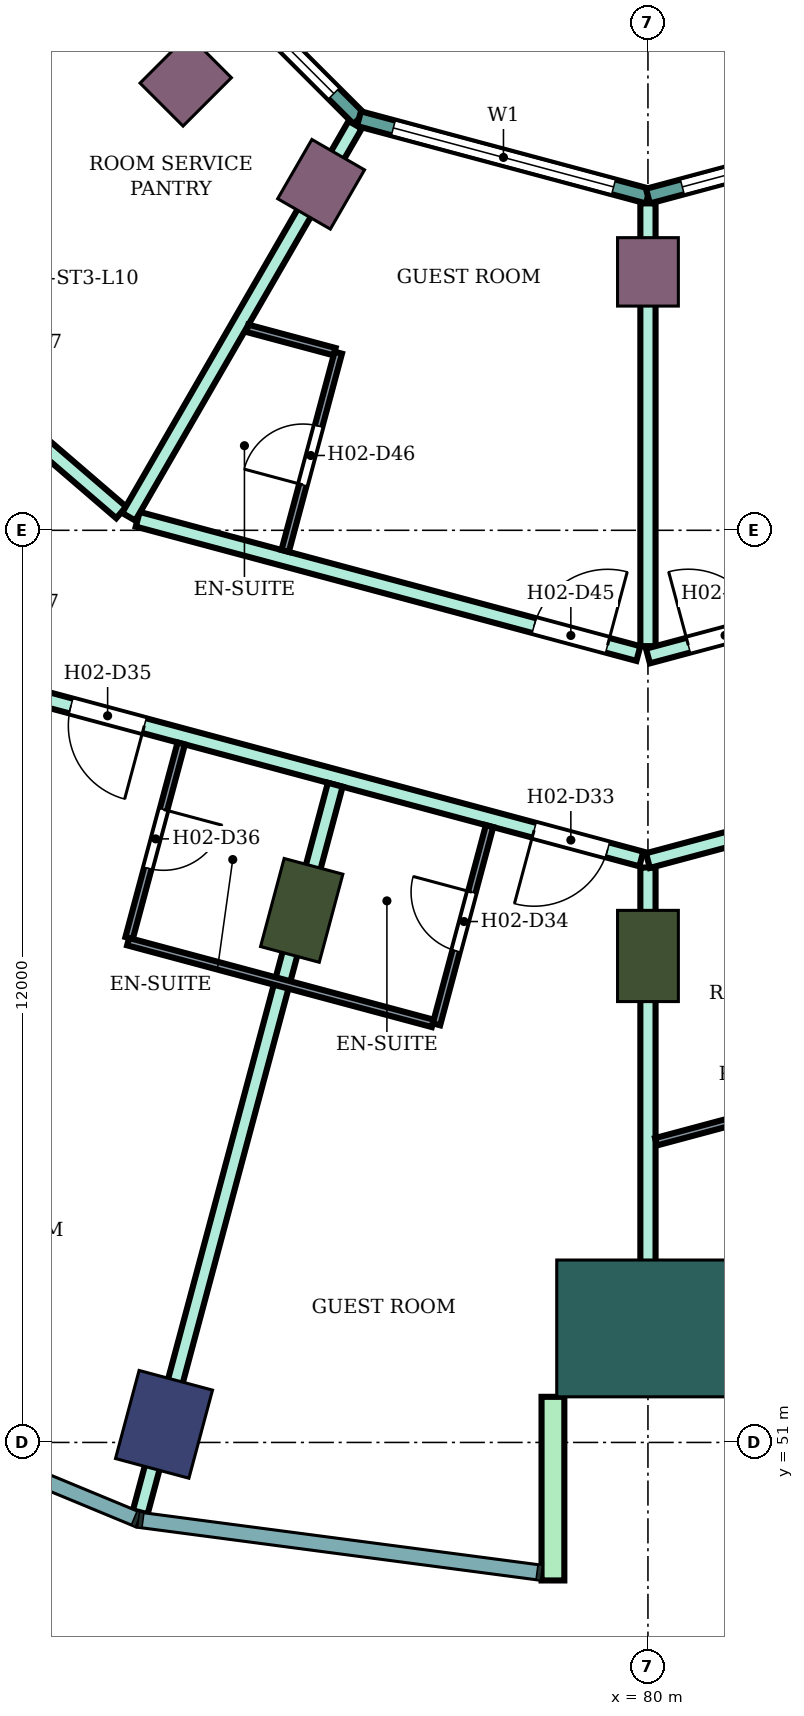
"""IFC4 building model, lengths in metres.
Left out: names, types, materials, properties, quantities, classifications, styles, units other than length and angle.
Written with IfcOpenShell. Run it as: python <this file> out.ifc"""

import sys

from ifc_helpers import new_model, si_unit, direction, frame, frame_2d, origin, origin_2d, place, context, subcontext, project, spatial, rectangle, extrude, element, fill, save


model = new_model("IFC4")
c1 = context("Model", 3, precision=1e-05, world=origin(), true_north=direction((0.0, 1.0)))
c2 = subcontext(c1, "Body", "Model", "MODEL_VIEW")
j1 = project(units=[si_unit("LENGTHUNIT", "METRE"), si_unit("PLANEANGLEUNIT", "RADIAN")], contexts=[c1])
p1 = place(None, origin())
s1 = spatial("IfcSite", under=j1, at=p1, CompositionType="ELEMENT")
p2 = place(p1, origin())
s2 = spatial("IfcBuilding", under=s1, at=p2, CompositionType="ELEMENT")
p3 = place(p2, frame((0.0, 0.0, 47.8)))
s3 = spatial("IfcBuildingStorey", under=s2, at=p3, CompositionType="ELEMENT", Elevation=47.8)
p4 = place(p3, frame((73.633, 51.238, 0.0), z_axis=(0.0, 0.0, 1.0), x_axis=(-0.258819045103, -0.965925826289, 0.0)))
e1 = element("IfcColumn", 1, at=p4, inside=s3, PredefinedType="COLUMN", context=c2, shape_type="SweptSolid", body=[
    extrude(rectangle(XDim=1.2, YDim=1.0, at=origin_2d()), origin(), (0.0, 0.0, 1.0), 3.8),
])
for number, where, z_axis, x_axis in (
    (2, (75.445, 58.0, 0.0), (0.0, 0.0, 1.0), (-0.259, -0.966, 0.0)),
    (3, (80.0, 57.4, 0.0), (0.0, 0.0, 1.0), (0.0, -1.0, 0.0)),
):
    element("IfcColumn", number, at=place(p3, frame(where, z_axis=z_axis, x_axis=x_axis)), inside=s3, PredefinedType="COLUMN", context=c2, shape_type="SweptSolid", body=[
        extrude(rectangle(XDim=1.2, YDim=0.8, at=origin_2d()), origin(), (0.0, 0.0, 1.0), 3.8),
    ])
for number, where, z_axis, x_axis in (
    (4, (73.919, 68.919, 0.0), (0.0, 0.0, 1.0), (-0.707, -0.707, 0.0)),
    (5, (75.7, 67.552, 0.0), (0.0, 0.0, 1.0), (-0.5, -0.866, 0.0)),
    (6, (80.0, 66.4, 0.0), (0.0, 0.0, 1.0), (0.0, -1.0, 0.0)),
):
    element("IfcColumn", number, at=place(p3, frame(where, z_axis=z_axis, x_axis=x_axis)), inside=s3, PredefinedType="COLUMN", context=c2, shape_type="SweptSolid", body=[
        extrude(rectangle(XDim=0.9, YDim=0.8, at=origin_2d()), origin(), (0.0, 0.0, 1.0), 3.8),
    ])
p5 = place(p3, frame((80.0, 52.5, 0.0), z_axis=(0.0, 0.0, 1.0), x_axis=(0.0, -1.0, 0.0)))
e7 = element("IfcColumn", 7, at=p5, inside=s3, PredefinedType="COLUMN", context=c2, shape_type="SweptSolid", body=[
    extrude(rectangle(XDim=1.8, YDim=2.4, at=origin_2d()), origin(), (0.0, 0.0, 1.0), 3.8),
])
p6 = place(p3, frame((78.75, 51.6, 0.0), z_axis=(0.0, 0.0, 1.0), x_axis=(0.0, -1.0, 0.0)))
e8 = element("IfcWall", 8, at=p6, inside=s3, PredefinedType="NOTDEFINED", context=c2, shape_type="SweptSolid", body=[
    extrude(rectangle(XDim=2.416, YDim=0.3, at=frame_2d((1.208, 0.0))), origin(), (0.0, 0.0, 1.0), 3.8),
])
p7 = place(p3, frame((73.415, 71.198, 0.0), z_axis=(0.0, 0.0, 1.0), x_axis=(0.707106781187, -0.707106781187, 0.0)))
e9 = element("IfcWall", 9, at=p7, inside=s3, PredefinedType="NOTDEFINED", context=c2, shape_type="SweptSolid", body=[
    extrude(rectangle(XDim=3.936, YDim=0.2, at=frame_2d((1.968, 0.0))), origin(), (0.0, 0.0, 1.0), 3.8),
])
p8 = place(p7, frame((0.468, 0.0, 0.9)))
e10 = element("IfcOpeningElement", 10, at=p8, cuts=e9, PredefinedType="OPENING", context=c2, shape_type="SweptSolid", body=[
    extrude(rectangle(XDim=3.0, YDim=2.3, at=frame_2d((1.5, 1.15))), frame((0.0, 0.11, 0.0), z_axis=(0.0, -1.0, 0.0), x_axis=(1.0, 0.0, 0.0)), (0.0, 0.0, 1.0), 0.22),
])
p9 = place(p3, frame((76.198, 68.415, 0.0), z_axis=(0.0, 0.0, 1.0), x_axis=(0.965933654434, -0.258789828301, 0.0)))
e11 = element("IfcWall", 11, at=p9, inside=s3, PredefinedType="NOTDEFINED", context=c2, shape_type="SweptSolid", body=[
    extrude(rectangle(XDim=3.936, YDim=0.2, at=frame_2d((1.968, 0.0))), origin(), (0.0, 0.0, 1.0), 3.8),
])
p10 = place(p9, frame((0.468, 0.0, 0.9)))
e12 = element("IfcOpeningElement", 12, at=p10, cuts=e11, PredefinedType="OPENING", context=c2, shape_type="SweptSolid", body=[
    extrude(rectangle(XDim=3.0, YDim=2.3, at=frame_2d((1.5, 1.15))), frame((0.0, 0.11, 0.0), z_axis=(0.0, -1.0, 0.0), x_axis=(1.0, 0.0, 0.0)), (0.0, 0.0, 1.0), 0.22),
])
p11 = place(p3, frame((80.0, 67.396, 0.0), z_axis=(0.0, 0.0, 1.0), x_axis=(0.965933654434, 0.258789828301, 0.0)))
e13 = element("IfcWall", 13, at=p11, inside=s3, PredefinedType="NOTDEFINED", context=c2, shape_type="SweptSolid", body=[
    extrude(rectangle(XDim=3.936, YDim=0.2, at=frame_2d((1.968, 0.0))), origin(), (0.0, 0.0, 1.0), 3.8),
])
p12 = place(p11, frame((0.468, 0.0, 0.9)))
e14 = element("IfcOpeningElement", 14, at=p12, cuts=e13, PredefinedType="OPENING", context=c2, shape_type="SweptSolid", body=[
    extrude(rectangle(XDim=3.0, YDim=2.3, at=frame_2d((1.5, 1.15))), frame((0.0, 0.11, 0.0), z_axis=(0.0, -1.0, 0.0), x_axis=(1.0, 0.0, 0.0)), (0.0, 0.0, 1.0), 0.22),
])
p13 = place(p3, frame((69.158, 66.6, 0.0), z_axis=(0.0, 0.0, 1.0), x_axis=(0.758063092745, -0.652181222835, 0.0)))
e15 = element("IfcWall", 15, at=p13, inside=s3, PredefinedType="PARTITIONING", context=c2, shape_type="SweptSolid", body=[
    extrude(rectangle(XDim=5.16, YDim=0.2, at=frame_2d((2.58, 0.0))), origin(), (0.0, 0.0, 1.0), 3.35),
])
p14 = place(p13, frame((2.165, 0.0, 0.0)))
e16 = element("IfcOpeningElement", 16, at=p14, cuts=e15, PredefinedType="OPENING", context=c2, shape_type="SweptSolid", body=[
    extrude(rectangle(XDim=0.9, YDim=2.1, at=frame_2d((0.45, 1.05))), frame((0.0, 0.11, 0.0), z_axis=(0.0, -1.0, 0.0), x_axis=(1.0, 0.0, 0.0)), (0.0, 0.0, 1.0), 0.22),
])
p15 = place(p3, frame((71.877, 60.832, 0.0), z_axis=(0.0, 0.0, 1.0), x_axis=(0.965852509869, -0.259092510851, 0.0)))
e17 = element("IfcWall", 17, at=p15, inside=s3, PredefinedType="PARTITIONING", context=c2, shape_type="SweptSolid", body=[
    extrude(rectangle(XDim=8.32, YDim=0.2, at=frame_2d((4.16, 0.0))), origin(), (0.0, 0.0, 1.0), 3.35),
])
p16 = place(p15, frame((6.86, 0.0, 0.0)))
e18 = element("IfcOpeningElement", 18, at=p16, cuts=e17, PredefinedType="OPENING", context=c2, shape_type="SweptSolid", body=[
    extrude(rectangle(XDim=1.0, YDim=2.1, at=frame_2d((0.5, 1.05))), frame((0.0, 0.11, 0.0), z_axis=(0.0, -1.0, 0.0), x_axis=(1.0, 0.0, 0.0)), (0.0, 0.0, 1.0), 0.22),
])
p17 = place(p15, frame((0.55, 0.0, 0.0)))
e19 = element("IfcOpeningElement", 19, at=p17, cuts=e17, PredefinedType="OPENING", context=c2, shape_type="SweptSolid", body=[
    extrude(rectangle(XDim=1.0, YDim=2.1, at=frame_2d((0.5, 1.05))), frame((0.0, 0.11, 0.0), z_axis=(0.0, -1.0, 0.0), x_axis=(1.0, 0.0, 0.0)), (0.0, 0.0, 1.0), 0.22),
])
p18 = place(p3, frame((73.287, 63.145, 0.0), z_axis=(0.0, 0.0, 1.0), x_axis=(0.965854200194, -0.259086209526, 0.0)))
e20 = element("IfcWall", 20, at=p18, inside=s3, PredefinedType="PARTITIONING", context=c2, shape_type="SweptSolid", body=[
    extrude(rectangle(XDim=6.82, YDim=0.2, at=frame_2d((3.41, 0.0))), origin(), (0.0, 0.0, 1.0), 3.35),
])
p19 = place(p18, frame((5.4, 0.0, 0.0)))
e21 = element("IfcOpeningElement", 21, at=p19, cuts=e20, PredefinedType="OPENING", context=c2, shape_type="SweptSolid", body=[
    extrude(rectangle(XDim=1.0, YDim=2.1, at=frame_2d((0.5, 1.05))), frame((0.0, 0.11, 0.0), z_axis=(0.0, -1.0, 0.0), x_axis=(1.0, 0.0, 0.0)), (0.0, 0.0, 1.0), 0.22),
])
p20 = place(p3, frame((73.169, 63.178, 0.0), z_axis=(0.0, 0.0, 1.0), x_axis=(0.50020860964, 0.865904929448, 0.0)))
e22 = element("IfcWall", 22, at=p20, inside=s3, PredefinedType="PARTITIONING", context=c2, shape_type="SweptSolid", body=[
    extrude(rectangle(XDim=5.955, YDim=0.2, at=frame_2d((2.978, 0.0))), origin(), (0.0, 0.0, 1.0), 3.35),
])
p21 = place(p3, frame((73.321, 50.081, 0.0), z_axis=(0.0, 0.0, 1.0), x_axis=(0.25891218439, 0.965900864879, 0.0)))
e23 = element("IfcWall", 23, at=p21, inside=s3, PredefinedType="PARTITIONING", context=c2, shape_type="SweptSolid", body=[
    extrude(rectangle(XDim=9.909, YDim=0.2, at=frame_2d((4.955, 0.0))), origin(), (0.0, 0.0, 1.0), 3.35),
])
p22 = place(p3, frame((80.0, 51.8, 0.0), z_axis=(0.0, 0.0, 1.0), x_axis=(0.0, 1.0, 0.0)))
e24 = element("IfcWall", 24, at=p22, inside=s3, PredefinedType="PARTITIONING", context=c2, shape_type="SweptSolid", body=[
    extrude(rectangle(XDim=6.764, YDim=0.2, at=frame_2d((3.382, 0.0))), origin(), (0.0, 0.0, 1.0), 3.35),
])
p23 = place(p3, frame((80.0, 58.655, 0.0), z_axis=(0.0, 0.0, 1.0), x_axis=(0.965967338894, 0.258664068224, 0.0)))
e25 = element("IfcWall", 25, at=p23, inside=s3, PredefinedType="PARTITIONING", context=c2, shape_type="SweptSolid", body=[
    extrude(rectangle(XDim=8.36, YDim=0.2, at=frame_2d((4.18, 0.0))), origin(), (0.0, 0.0, 1.0), 3.35),
])
p24 = place(p23, frame((6.86, 0.0, 0.0)))
e26 = element("IfcOpeningElement", 26, at=p24, cuts=e25, PredefinedType="OPENING", context=c2, shape_type="SweptSolid", body=[
    extrude(rectangle(XDim=1.0, YDim=2.1, at=frame_2d((0.5, 1.05))), frame((0.0, 0.11, 0.0), z_axis=(0.0, -1.0, 0.0), x_axis=(1.0, 0.0, 0.0)), (0.0, 0.0, 1.0), 0.22),
])
p25 = place(p23, frame((1.675, 0.0, 0.0)))
e27 = element("IfcOpeningElement", 27, at=p25, cuts=e25, PredefinedType="OPENING", context=c2, shape_type="SweptSolid", body=[
    extrude(rectangle(XDim=0.9, YDim=2.1, at=frame_2d((0.45, 1.05))), frame((0.0, 0.11, 0.0), z_axis=(0.0, -1.0, 0.0), x_axis=(1.0, 0.0, 0.0)), (0.0, 0.0, 1.0), 0.22),
])
p26 = place(p3, frame((80.0, 61.476, 0.0), z_axis=(0.0, 0.0, 1.0), x_axis=(0.0, 1.0, 0.0)))
e28 = element("IfcWall", 28, at=p26, inside=s3, PredefinedType="PARTITIONING", context=c2, shape_type="SweptSolid", body=[
    extrude(rectangle(XDim=5.825, YDim=0.2, at=frame_2d((2.913, 0.0))), origin(), (0.0, 0.0, 1.0), 3.35),
])
p27 = place(p3, frame((80.0, 61.346, 0.0), z_axis=(0.0, 0.0, 1.0), x_axis=(0.965924181808, 0.258825182312, 0.0)))
e29 = element("IfcWall", 29, at=p27, inside=s3, PredefinedType="PARTITIONING", context=c2, shape_type="SweptSolid", body=[
    extrude(rectangle(XDim=6.94, YDim=0.2, at=frame_2d((3.47, 0.0))), origin(), (0.0, 0.0, 1.0), 3.35),
])
p28 = place(p27, frame((0.55, 0.0, 0.0)))
e30 = element("IfcOpeningElement", 30, at=p28, cuts=e29, PredefinedType="OPENING", context=c2, shape_type="SweptSolid", body=[
    extrude(rectangle(XDim=1.0, YDim=2.1, at=frame_2d((0.5, 1.05))), frame((0.0, 0.11, 0.0), z_axis=(0.0, -1.0, 0.0), x_axis=(1.0, 0.0, 0.0)), (0.0, 0.0, 1.0), 0.22),
])
p29 = place(p3, frame((73.174, 57.636, 0.0), z_axis=(0.0, 0.0, 1.0), x_axis=(0.258952498977, 0.96589005755, 0.0)))
e31 = element("IfcWall", 31, at=p29, inside=s3, PredefinedType="PARTITIONING", context=c2, shape_type="SweptSolid", body=[
    extrude(rectangle(XDim=2.65, YDim=0.1, at=frame_2d((1.325, 0.0))), origin(), (0.0, 0.0, 1.0), 3.35),
])
p30 = place(p29, frame((0.95, 0.0, 0.0)))
e32 = element("IfcOpeningElement", 32, at=p30, cuts=e31, PredefinedType="OPENING", context=c2, shape_type="SweptSolid", body=[
    extrude(rectangle(XDim=0.8, YDim=2.1, at=frame_2d((0.4, 1.05))), frame((0.0, 0.06, 0.0), z_axis=(0.0, -1.0, 0.0), x_axis=(1.0, 0.0, 0.0)), (0.0, 0.0, 1.0), 0.12),
])
p31 = place(p3, frame((73.161, 57.588, 0.0), z_axis=(0.0, 0.0, 1.0), x_axis=(0.965858994467, -0.259068336173, 0.0)))
e33 = element("IfcWall", 33, at=p31, inside=s3, PredefinedType="PARTITIONING", context=c2, shape_type="SweptSolid", body=[
    extrude(rectangle(XDim=4.15, YDim=0.1, at=frame_2d((2.075, 0.0))), origin(), (0.0, 0.0, 1.0), 3.35),
])
p32 = place(p3, frame((74.729, 65.657, 0.0), z_axis=(0.0, 0.0, 1.0), x_axis=(0.965948051503, -0.258736085224, 0.0)))
e34 = element("IfcWall", 34, at=p32, inside=s3, PredefinedType="PARTITIONING", context=c2, shape_type="SweptSolid", body=[
    extrude(rectangle(XDim=1.189, YDim=0.1, at=frame_2d((0.594, 0.0))), origin(), (0.0, 0.0, 1.0), 3.35),
])
p33 = place(p3, frame((75.227, 62.729, 0.0), z_axis=(0.0, 0.0, 1.0), x_axis=(0.258945475746, 0.965891940432, 0.0)))
e35 = element("IfcWall", 35, at=p33, inside=s3, PredefinedType="PARTITIONING", context=c2, shape_type="SweptSolid", body=[
    extrude(rectangle(XDim=2.7, YDim=0.1, at=frame_2d((1.35, 0.0))), origin(), (0.0, 0.0, 1.0), 3.35),
])
p34 = place(p33, frame((0.9, 0.0, 0.0)))
e36 = element("IfcOpeningElement", 36, at=p34, cuts=e35, PredefinedType="OPENING", context=c2, shape_type="SweptSolid", body=[
    extrude(rectangle(XDim=0.8, YDim=2.1, at=frame_2d((0.4, 1.05))), frame((0.0, 0.06, 0.0), z_axis=(0.0, -1.0, 0.0), x_axis=(1.0, 0.0, 0.0)), (0.0, 0.0, 1.0), 0.12),
])
p35 = place(p3, frame((77.218, 56.501, 0.0), z_axis=(0.0, 0.0, 1.0), x_axis=(0.258591408257, 0.965986792651, 0.0)))
e37 = element("IfcWall", 37, at=p35, inside=s3, PredefinedType="PARTITIONING", context=c2, shape_type="SweptSolid", body=[
    extrude(rectangle(XDim=2.699, YDim=0.1, at=frame_2d((1.35, 0.0))), origin(), (0.0, 0.0, 1.0), 3.35),
])
p36 = place(p35, frame((1.0, 0.0, 0.0)))
e38 = element("IfcOpeningElement", 38, at=p36, cuts=e37, PredefinedType="OPENING", context=c2, shape_type="SweptSolid", body=[
    extrude(rectangle(XDim=0.8, YDim=2.1, at=frame_2d((0.4, 1.05))), frame((0.0, 0.06, 0.0), z_axis=(0.0, -1.0, 0.0), x_axis=(1.0, 0.0, 0.0)), (0.0, 0.0, 1.0), 0.12),
])
p37 = place(p3, frame((80.106, 54.956, 0.0), z_axis=(0.0, 0.0, 1.0), x_axis=(0.965910666284, 0.258875616386, 0.0)))
e39 = element("IfcWall", 39, at=p37, inside=s3, PredefinedType="PARTITIONING", context=c2, shape_type="SweptSolid", body=[
    extrude(rectangle(XDim=4.985, YDim=0.1, at=frame_2d((2.493, 0.0))), origin(), (0.0, 0.0, 1.0), 3.35),
])
p38 = place(p37, frame((2.038, 0.0, 0.0)))
e40 = element("IfcOpeningElement", 40, at=p38, cuts=e39, PredefinedType="OPENING", context=c2, shape_type="SweptSolid", body=[
    extrude(rectangle(XDim=0.9, YDim=2.1, at=frame_2d((0.45, 1.05))), frame((0.0, 0.06, 0.0), z_axis=(0.0, -1.0, 0.0), x_axis=(1.0, 0.0, 0.0)), (0.0, 0.0, 1.0), 0.12),
])
p39 = place(p8, origin())
e41 = element("IfcWindow", 41, at=p39, inside=s3, PartitioningType="SINGLE_PANEL", PredefinedType="WINDOW", context=c2, shape_type="SweptSolid", body=[
    extrude(rectangle(XDim=3.0, YDim=2.3, at=frame_2d((1.5, 1.15))), frame((0.0, 0.03, 0.0), z_axis=(0.0, -1.0, 0.0), x_axis=(1.0, 0.0, 0.0)), (0.0, 0.0, 1.0), 0.06),
])
fill(e10, e41)
p40 = place(p10, origin())
e42 = element("IfcWindow", 42, at=p40, inside=s3, PartitioningType="SINGLE_PANEL", PredefinedType="WINDOW", context=c2, shape_type="SweptSolid", body=[
    extrude(rectangle(XDim=3.0, YDim=2.3, at=frame_2d((1.5, 1.15))), frame((0.0, 0.03, 0.0), z_axis=(0.0, -1.0, 0.0), x_axis=(1.0, 0.0, 0.0)), (0.0, 0.0, 1.0), 0.06),
])
fill(e12, e42)
p41 = place(p12, origin())
e43 = element("IfcWindow", 43, at=p41, inside=s3, PartitioningType="SINGLE_PANEL", PredefinedType="WINDOW", context=c2, shape_type="SweptSolid", body=[
    extrude(rectangle(XDim=3.0, YDim=2.3, at=frame_2d((1.5, 1.15))), frame((0.0, 0.03, 0.0), z_axis=(0.0, -1.0, 0.0), x_axis=(1.0, 0.0, 0.0)), (0.0, 0.0, 1.0), 0.06),
])
fill(e14, e43)
p42 = place(p16, frame((1.0, 0.0, 0.0), z_axis=(0.0, 0.0, 1.0), x_axis=(-1.0, 0.0, 0.0)))
e44 = element("IfcDoor", 44, at=p42, inside=s3, OperationType="SINGLE_SWING_RIGHT", PredefinedType="DOOR", context=c2, shape_type="SweptSolid", body=[
    extrude(rectangle(XDim=1.0, YDim=2.1, at=frame_2d((0.5, 1.05))), frame((0.0, 0.025, 0.0), z_axis=(0.0, -1.0, 0.0), x_axis=(1.0, 0.0, 0.0)), (0.0, 0.0, 1.0), 0.05),
])
fill(e18, e44)
p43 = place(p36, origin())
e45 = element("IfcDoor", 45, at=p43, inside=s3, OperationType="SINGLE_SWING_RIGHT", PredefinedType="DOOR", context=c2, shape_type="SweptSolid", body=[
    extrude(rectangle(XDim=0.8, YDim=2.1, at=frame_2d((0.4, 1.05))), frame((0.0, 0.025, 0.0), z_axis=(0.0, -1.0, 0.0), x_axis=(1.0, 0.0, 0.0)), (0.0, 0.0, 1.0), 0.05),
])
fill(e38, e45)
p44 = place(p17, frame((1.0, 0.0, 0.0), z_axis=(0.0, 0.0, 1.0), x_axis=(-1.0, 0.0, 0.0)))
e46 = element("IfcDoor", 46, at=p44, inside=s3, OperationType="SINGLE_SWING_LEFT", PredefinedType="DOOR", context=c2, shape_type="SweptSolid", body=[
    extrude(rectangle(XDim=1.0, YDim=2.1, at=frame_2d((0.5, 1.05))), frame((0.0, 0.025, 0.0), z_axis=(0.0, -1.0, 0.0), x_axis=(1.0, 0.0, 0.0)), (0.0, 0.0, 1.0), 0.05),
])
fill(e19, e46)
p45 = place(p30, frame((0.8, 0.0, 0.0), z_axis=(0.0, 0.0, 1.0), x_axis=(-1.0, 0.0, 0.0)))
e47 = element("IfcDoor", 47, at=p45, inside=s3, OperationType="SINGLE_SWING_LEFT", PredefinedType="DOOR", context=c2, shape_type="SweptSolid", body=[
    extrude(rectangle(XDim=0.8, YDim=2.1, at=frame_2d((0.4, 1.05))), frame((0.0, 0.025, 0.0), z_axis=(0.0, -1.0, 0.0), x_axis=(1.0, 0.0, 0.0)), (0.0, 0.0, 1.0), 0.05),
])
fill(e32, e47)
p46 = place(p28, origin())
e48 = element("IfcDoor", 48, at=p46, inside=s3, OperationType="SINGLE_SWING_LEFT", PredefinedType="DOOR", context=c2, shape_type="SweptSolid", body=[
    extrude(rectangle(XDim=1.0, YDim=2.1, at=frame_2d((0.5, 1.05))), frame((0.0, 0.025, 0.0), z_axis=(0.0, -1.0, 0.0), x_axis=(1.0, 0.0, 0.0)), (0.0, 0.0, 1.0), 0.05),
])
fill(e30, e48)
p47 = place(p19, origin())
e49 = element("IfcDoor", 49, at=p47, inside=s3, OperationType="SINGLE_SWING_RIGHT", PredefinedType="DOOR", context=c2, shape_type="SweptSolid", body=[
    extrude(rectangle(XDim=1.0, YDim=2.1, at=frame_2d((0.5, 1.05))), frame((0.0, 0.025, 0.0), z_axis=(0.0, -1.0, 0.0), x_axis=(1.0, 0.0, 0.0)), (0.0, 0.0, 1.0), 0.05),
])
fill(e21, e49)
p48 = place(p34, origin())
e50 = element("IfcDoor", 50, at=p48, inside=s3, OperationType="SINGLE_SWING_LEFT", PredefinedType="DOOR", context=c2, shape_type="SweptSolid", body=[
    extrude(rectangle(XDim=0.8, YDim=2.1, at=frame_2d((0.4, 1.05))), frame((0.0, 0.025, 0.0), z_axis=(0.0, -1.0, 0.0), x_axis=(1.0, 0.0, 0.0)), (0.0, 0.0, 1.0), 0.05),
])
fill(e36, e50)
save(model, sys.argv[1])
